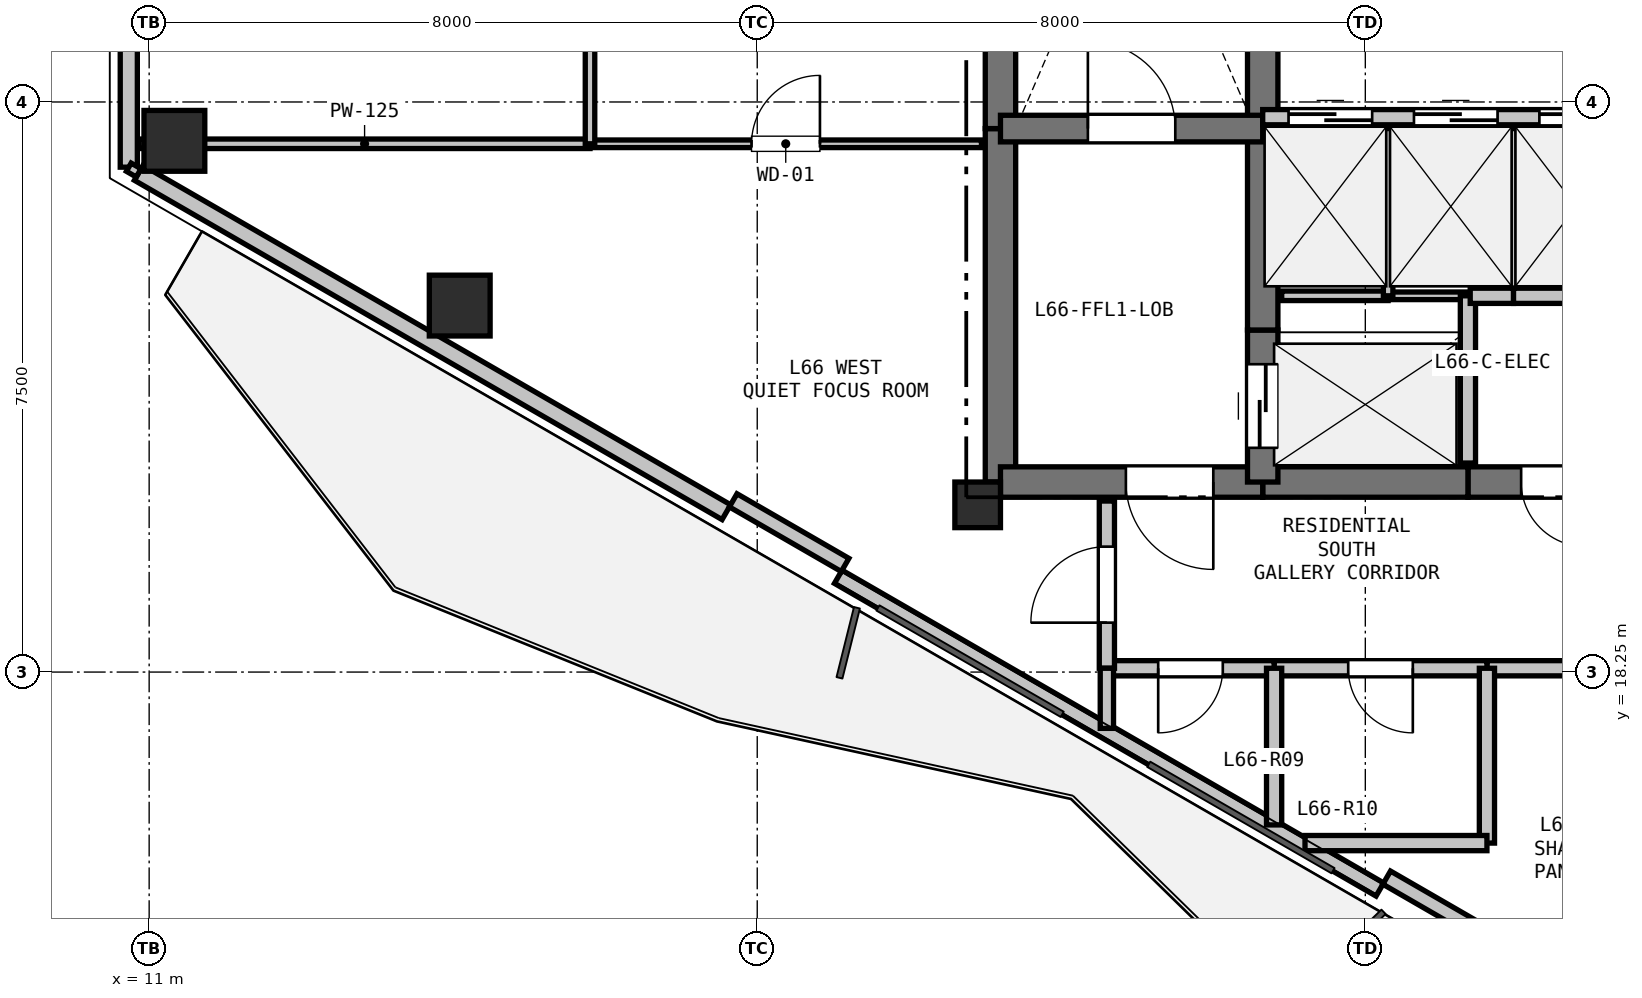
"""IFC4 building model, lengths in metres.
Left out: names, types, materials, properties, quantities, classifications, styles, units other than length and angle.
Written with IfcOpenShell. Run it as: python <this file> out.ifc"""

import sys

from ifc_helpers import new_model, si_unit, direction, frame, frame_2d, origin, origin_2d, place, context, subcontext, project, spatial, rectangle, hollow_rectangle, extrude, element, fill, save


model = new_model("IFC4")
c1 = context("Model", 3, precision=1e-05, world=origin(), true_north=direction((0.0, 1.0)))
c2 = subcontext(c1, "Body", "Model", "MODEL_VIEW")
j1 = project(units=[si_unit("LENGTHUNIT", "METRE"), si_unit("PLANEANGLEUNIT", "RADIAN")], contexts=[c1])
p1 = place(None, origin())
s1 = spatial("IfcSite", under=j1, at=p1, CompositionType="ELEMENT")
p2 = place(p1, origin())
s2 = spatial("IfcBuilding", under=s1, at=p2, CompositionType="ELEMENT")
p3 = place(p2, frame((0.0, 0.0, 236.4)))
s3 = spatial("IfcBuildingStorey", under=s2, at=p3, CompositionType="ELEMENT", Elevation=236.4)
p4 = place(p3, frame((21.9, 20.45, 0.0), z_axis=(0.0, 0.0, 1.0), x_axis=(1.0, 0.0, 0.0)))
e1 = element("IfcColumn", 1, at=p4, inside=s3, PredefinedType="COLUMN", context=c2, shape_type="SweptSolid", body=[
    extrude(rectangle(XDim=0.6, YDim=0.6, at=origin_2d()), origin(), (0.0, 0.0, 1.0), 3.3),
])
for number, where, z_axis, x_axis in (
    (2, (15.086, 23.072, 0.0), (0.0, 0.0, 1.0), (1.0, 0.0, 0.0)),
    (3, (11.332, 25.239, 0.0), (0.0, 0.0, 1.0), (1.0, 0.0, 0.0)),
):
    element("IfcColumn", number, at=place(p3, frame(where, z_axis=z_axis, x_axis=x_axis)), inside=s3, PredefinedType="COLUMN", context=c2, shape_type="SweptSolid", body=[
        extrude(hollow_rectangle(XDim=0.8, YDim=0.8, WallThickness=0.025, at=origin_2d()), origin(), (0.0, 0.0, 1.0), 3.3),
    ])
p5 = place(p3, frame((10.732, 24.892, 0.0), z_axis=(0.0, 0.0, 1.0), x_axis=(0.0, 1.0, 0.0)))
e4 = element("IfcWall", 4, at=p5, inside=s3, PredefinedType="SOLIDWALL", context=c2, shape_type="SweptSolid", body=[
    extrude(rectangle(XDim=3.715, YDim=0.225, at=frame_2d((1.858, 0.0))), origin(), (0.0, 0.0, 1.0), 2.7),
])
p6 = place(p3, frame((27.191, 15.389, 0.0), z_axis=(0.0, 0.0, 1.0), x_axis=(-0.866019557082, 0.500010126649, 0.0)))
e5 = element("IfcWall", 5, at=p6, inside=s3, PredefinedType="PARAPET", context=c2, shape_type="SweptSolid", body=[
    extrude(rectangle(XDim=8.228, YDim=0.2, at=frame_2d((4.114, 0.0))), origin(), (0.0, 0.0, 1.0), 0.2),
])
p7 = place(p3, frame((18.594, 20.354, 0.0), z_axis=(0.0, 0.0, 1.0), x_axis=(-0.866026655105, 0.499997832642, 0.0)))
e6 = element("IfcWall", 6, at=p7, inside=s3, PredefinedType="SOLIDWALL", context=c2, shape_type="SweptSolid", body=[
    extrude(rectangle(XDim=8.928, YDim=0.225, at=frame_2d((4.464, 0.0))), origin(), (0.0, 0.0, 1.0), 2.7),
])
for number, where, z_axis, x_axis in (
    (7, (28.754, 14.695, 0.0), (0.0, 0.0, 1.0), (-0.866, 0.5, 0.0)),
    (8, (20.156, 19.659, 0.0), (0.0, 0.0, 1.0), (-0.866, 0.5, 0.0)),
):
    element("IfcWall", number, at=place(p3, frame(where, z_axis=z_axis, x_axis=x_axis)), inside=s3, PredefinedType="PARAPET", context=c2, shape_type="SweptSolid", body=[
        extrude(rectangle(XDim=1.7, YDim=0.2, at=frame_2d((0.85, 0.0))), origin(), (0.0, 0.0, 1.0), 2.7),
    ])
p8 = place(p3, frame((22.2, 20.75, 0.0), z_axis=(0.0, 0.0, 1.0), x_axis=(0.0, 1.0, 0.0)))
e9 = element("IfcWall", 9, at=p8, inside=s3, PredefinedType="SHEAR", context=c2, shape_type="SweptSolid", body=[
    extrude(rectangle(XDim=4.65, YDim=0.4, at=frame_2d((2.325, 0.0))), origin(), (0.0, 0.0, 1.0), 3.08),
])
p9 = place(p3, frame((22.2, 25.4, 0.0), z_axis=(0.0, 0.0, 1.0), x_axis=(0.0, 1.0, 0.0)))
e10 = element("IfcWall", 10, at=p9, inside=s3, PredefinedType="SHEAR", context=c2, shape_type="SweptSolid", body=[
    extrude(rectangle(XDim=7.35, YDim=0.4, at=frame_2d((3.675, 0.0))), origin(), (0.0, 0.0, 1.0), 3.08),
])
p10 = place(p3, frame((30.6, 20.75, 0.0), z_axis=(0.0, 0.0, 1.0), x_axis=(-1.0, 0.0, 0.0)))
e11 = element("IfcWall", 11, at=p10, inside=s3, PredefinedType="SHEAR", context=c2, shape_type="SweptSolid", body=[
    extrude(rectangle(XDim=2.25, YDim=0.4, at=frame_2d((1.125, 0.0))), origin(), (0.0, 0.0, 1.0), 3.08),
])
p11 = place(p10, frame((0.7, 0.0, 0.0)))
e12 = element("IfcOpeningElement", 12, at=p11, cuts=e11, PredefinedType="OPENING", context=c2, shape_type="SweptSolid", body=[
    extrude(rectangle(XDim=0.85, YDim=2.1, at=frame_2d((0.425, 1.05))), frame((0.0, 0.21, 0.0), z_axis=(0.0, -1.0, 0.0), x_axis=(1.0, 0.0, 0.0)), (0.0, 0.0, 1.0), 0.42),
])
p12 = place(p3, frame((28.35, 20.75, 0.0), z_axis=(0.0, 0.0, 1.0), x_axis=(-1.0, 0.0, 0.0)))
e13 = element("IfcWall", 13, at=p12, inside=s3, PredefinedType="SHEAR", context=c2, shape_type="SweptSolid", body=[
    extrude(rectangle(XDim=2.7, YDim=0.4, at=frame_2d((1.35, 0.0))), origin(), (0.0, 0.0, 1.0), 3.08),
])
p13 = place(p3, frame((25.65, 20.75, 0.0), z_axis=(0.0, 0.0, 1.0), x_axis=(-1.0, 0.0, 0.0)))
e14 = element("IfcWall", 14, at=p13, inside=s3, PredefinedType="SHEAR", context=c2, shape_type="SweptSolid", body=[
    extrude(rectangle(XDim=3.45, YDim=0.4, at=frame_2d((1.725, 0.0))), origin(), (0.0, 0.0, 1.0), 3.08),
])
p14 = place(p13, frame((0.65, 0.0, 0.0)))
e15 = element("IfcOpeningElement", 15, at=p14, cuts=e14, PredefinedType="OPENING", context=c2, shape_type="SweptSolid", body=[
    extrude(rectangle(XDim=1.15, YDim=2.15, at=frame_2d((0.575, 1.075))), frame((0.0, 0.21, 0.0), z_axis=(0.0, -1.0, 0.0), x_axis=(1.0, 0.0, 0.0)), (0.0, 0.0, 1.0), 0.42),
])
p15 = place(p3, frame((25.65, 20.75, 0.0), z_axis=(0.0, 0.0, 1.0), x_axis=(0.0, 1.0, 0.0)))
e16 = element("IfcWall", 16, at=p15, inside=s3, PredefinedType="SHEAR", context=c2, shape_type="SweptSolid", body=[
    extrude(rectangle(XDim=2.0, YDim=0.4, at=frame_2d((1.0, 0.0))), origin(), (0.0, 0.0, 1.0), 3.08),
])
p16 = place(p15, frame((0.45, 0.0, 0.0)))
e17 = element("IfcOpeningElement", 17, at=p16, cuts=e16, PredefinedType="OPENING", context=c2, shape_type="SweptSolid", body=[
    extrude(rectangle(XDim=1.1, YDim=2.15, at=frame_2d((0.55, 1.075))), frame((0.0, 0.21, 0.0), z_axis=(0.0, -1.0, 0.0), x_axis=(1.0, 0.0, 0.0)), (0.0, 0.0, 1.0), 0.42),
])
p17 = place(p3, frame((25.65, 22.75, 0.0), z_axis=(0.0, 0.0, 1.0), x_axis=(0.0, 1.0, 0.0)))
e18 = element("IfcWall", 18, at=p17, inside=s3, PredefinedType="SHEAR", context=c2, shape_type="SweptSolid", body=[
    extrude(rectangle(XDim=2.8, YDim=0.4, at=frame_2d((1.4, 0.0))), origin(), (0.0, 0.0, 1.0), 3.08),
])
p18 = place(p3, frame((25.65, 25.55, 0.0), z_axis=(0.0, 0.0, 1.0), x_axis=(0.0, 1.0, 0.0)))
e19 = element("IfcWall", 19, at=p18, inside=s3, PredefinedType="SHEAR", context=c2, shape_type="SweptSolid", body=[
    extrude(rectangle(XDim=2.4, YDim=0.4, at=frame_2d((1.2, 0.0))), origin(), (0.0, 0.0, 1.0), 3.08),
])
p19 = place(p3, frame((22.2, 25.4, 0.0), z_axis=(0.0, 0.0, 1.0), x_axis=(1.0, 0.0, 0.0)))
e20 = element("IfcWall", 20, at=p19, inside=s3, PredefinedType="SHEAR", context=c2, shape_type="SweptSolid", body=[
    extrude(rectangle(XDim=3.45, YDim=0.35, at=frame_2d((1.725, 0.0))), origin(), (0.0, 0.0, 1.0), 3.08),
])
p20 = place(p19, frame((1.15, 0.0, 0.0)))
e21 = element("IfcOpeningElement", 21, at=p20, cuts=e20, PredefinedType="OPENING", context=c2, shape_type="SweptSolid", body=[
    extrude(rectangle(XDim=1.15, YDim=2.15, at=frame_2d((0.575, 1.075))), frame((0.0, 0.185, 0.0), z_axis=(0.0, -1.0, 0.0), x_axis=(1.0, 0.0, 0.0)), (0.0, 0.0, 1.0), 0.37),
])
p21 = place(p3, frame((25.65, 25.55, 0.0), z_axis=(0.0, 0.0, 1.0), x_axis=(1.0, 0.0, 0.0)))
e22 = element("IfcWall", 22, at=p21, inside=s3, PredefinedType="PARTITIONING", context=c2, shape_type="SweptSolid", body=[
    extrude(rectangle(XDim=4.95, YDim=0.2, at=frame_2d((2.475, 0.0))), origin(), (0.0, 0.0, 1.0), 3.08),
])
p22 = place(p21, frame((0.34, 0.0, 0.0)))
e23 = element("IfcOpeningElement", 23, at=p22, cuts=e22, PredefinedType="OPENING", context=c2, shape_type="SweptSolid", body=[
    extrude(rectangle(XDim=1.1, YDim=2.15, at=frame_2d((0.55, 1.075))), frame((0.0, 0.11, 0.0), z_axis=(0.0, -1.0, 0.0), x_axis=(1.0, 0.0, 0.0)), (0.0, 0.0, 1.0), 0.22),
])
p23 = place(p21, frame((1.99, 0.0, 0.0)))
e24 = element("IfcOpeningElement", 24, at=p23, cuts=e22, PredefinedType="OPENING", context=c2, shape_type="SweptSolid", body=[
    extrude(rectangle(XDim=1.1, YDim=2.15, at=frame_2d((0.55, 1.075))), frame((0.0, 0.11, 0.0), z_axis=(0.0, -1.0, 0.0), x_axis=(1.0, 0.0, 0.0)), (0.0, 0.0, 1.0), 0.22),
])
p24 = place(p21, frame((3.64, 0.0, 0.0)))
e25 = element("IfcOpeningElement", 25, at=p24, cuts=e22, PredefinedType="OPENING", context=c2, shape_type="SweptSolid", body=[
    extrude(rectangle(XDim=1.1, YDim=2.15, at=frame_2d((0.55, 1.075))), frame((0.0, 0.11, 0.0), z_axis=(0.0, -1.0, 0.0), x_axis=(1.0, 0.0, 0.0)), (0.0, 0.0, 1.0), 0.22),
])
p25 = place(p3, frame((25.9, 23.2, 0.0), z_axis=(0.0, 0.0, 1.0), x_axis=(1.0, 0.0, 0.0)))
e26 = element("IfcWall", 26, at=p25, inside=s3, PredefinedType="PARTITIONING", context=c2, shape_type="SweptSolid", body=[
    extrude(rectangle(XDim=1.4, YDim=0.125, at=frame_2d((0.7, 0.0))), origin(), (0.0, 0.0, 1.0), 3.08),
])
p26 = place(p3, frame((27.3, 23.2, 0.0), z_axis=(0.0, 0.0, 1.0), x_axis=(1.0, 0.0, 0.0)))
e27 = element("IfcWall", 27, at=p26, inside=s3, PredefinedType="PARTITIONING", context=c2, shape_type="SweptSolid", body=[
    extrude(rectangle(XDim=1.05, YDim=0.1, at=frame_2d((0.525, 0.0))), origin(), (0.0, 0.0, 1.0), 3.08),
])
p27 = place(p3, frame((28.35, 23.2, 0.0), z_axis=(0.0, 0.0, 1.0), x_axis=(0.0, -1.0, 0.0)))
e28 = element("IfcWall", 28, at=p27, inside=s3, PredefinedType="PARTITIONING", context=c2, shape_type="SweptSolid", body=[
    extrude(rectangle(XDim=2.2, YDim=0.2, at=frame_2d((1.1, 0.0))), origin(), (0.0, 0.0, 1.0), 3.08),
])
p28 = place(p3, frame((27.3, 25.4, 0.0), z_axis=(0.0, 0.0, 1.0), x_axis=(0.0, -1.0, 0.0)))
e29 = element("IfcWall", 29, at=p28, inside=s3, PredefinedType="PARTITIONING", context=c2, shape_type="SweptSolid", body=[
    extrude(rectangle(XDim=2.2, YDim=0.125, at=frame_2d((1.1, 0.0))), origin(), (0.0, 0.0, 1.0), 3.08),
])
p29 = place(p3, frame((28.95, 25.4, 0.0), z_axis=(0.0, 0.0, 1.0), x_axis=(0.0, -1.0, 0.0)))
e30 = element("IfcWall", 30, at=p29, inside=s3, PredefinedType="PARTITIONING", context=c2, shape_type="SweptSolid", body=[
    extrude(rectangle(XDim=2.2, YDim=0.1, at=frame_2d((1.1, 0.0))), origin(), (0.0, 0.0, 1.0), 3.08),
])
p30 = place(p3, frame((28.95, 23.2, 0.0), z_axis=(0.0, 0.0, 1.0), x_axis=(-1.0, 0.0, 0.0)))
e31 = element("IfcWall", 31, at=p30, inside=s3, PredefinedType="PARTITIONING", context=c2, shape_type="SweptSolid", body=[
    extrude(rectangle(XDim=0.57, YDim=0.2, at=frame_2d((0.285, 0.0))), origin(), (0.0, 0.0, 1.0), 3.08),
])
p31 = place(p3, frame((30.6, 23.2, 0.0), z_axis=(0.0, 0.0, 1.0), x_axis=(-1.0, 0.0, 0.0)))
e32 = element("IfcWall", 32, at=p31, inside=s3, PredefinedType="PARTITIONING", context=c2, shape_type="SweptSolid", body=[
    extrude(rectangle(XDim=1.65, YDim=0.2, at=frame_2d((0.825, 0.0))), origin(), (0.0, 0.0, 1.0), 3.08),
])
p32 = place(p3, frame((31.8, 18.3, 0.0), z_axis=(0.0, 0.0, 1.0), x_axis=(-1.0, 0.0, 0.0)))
e33 = element("IfcWall", 33, at=p32, inside=s3, PredefinedType="PARTITIONING", context=c2, shape_type="SweptSolid", body=[
    extrude(rectangle(XDim=3.2, YDim=0.2, at=frame_2d((1.6, 0.0))), origin(), (0.0, 0.0, 1.0), 3.08),
])
p33 = place(p32, frame((1.1, 0.0, 0.0)))
e34 = element("IfcOpeningElement", 34, at=p33, cuts=e33, PredefinedType="OPENING", context=c2, shape_type="SweptSolid", body=[
    extrude(rectangle(XDim=1.0, YDim=2.15, at=frame_2d((0.5, 1.075))), frame((0.0, 0.11, 0.0), z_axis=(0.0, -1.0, 0.0), x_axis=(1.0, 0.0, 0.0)), (0.0, 0.0, 1.0), 0.22),
])
p34 = place(p3, frame((28.6, 18.3, 0.0), z_axis=(0.0, 0.0, 1.0), x_axis=(-1.0, 0.0, 0.0)))
e35 = element("IfcWall", 35, at=p34, inside=s3, PredefinedType="PARTITIONING", context=c2, shape_type="SweptSolid", body=[
    extrude(rectangle(XDim=2.8, YDim=0.2, at=frame_2d((1.4, 0.0))), origin(), (0.0, 0.0, 1.0), 3.08),
])
p35 = place(p34, frame((0.975, 0.0, 0.0)))
e36 = element("IfcOpeningElement", 36, at=p35, cuts=e35, PredefinedType="OPENING", context=c2, shape_type="SweptSolid", body=[
    extrude(rectangle(XDim=0.85, YDim=2.1, at=frame_2d((0.425, 1.05))), frame((0.0, 0.11, 0.0), z_axis=(0.0, -1.0, 0.0), x_axis=(1.0, 0.0, 0.0)), (0.0, 0.0, 1.0), 0.22),
])
p36 = place(p3, frame((25.8, 18.3, 0.0), z_axis=(0.0, 0.0, 1.0), x_axis=(-1.0, 0.0, 0.0)))
e37 = element("IfcWall", 37, at=p36, inside=s3, PredefinedType="PARTITIONING", context=c2, shape_type="SweptSolid", body=[
    extrude(rectangle(XDim=2.2, YDim=0.2, at=frame_2d((1.1, 0.0))), origin(), (0.0, 0.0, 1.0), 2.365),
])
p37 = place(p36, frame((0.675, 0.0, 0.0)))
e38 = element("IfcOpeningElement", 38, at=p37, cuts=e37, PredefinedType="OPENING", context=c2, shape_type="SweptSolid", body=[
    extrude(rectangle(XDim=0.85, YDim=2.1, at=frame_2d((0.425, 1.05))), frame((0.0, 0.11, 0.0), z_axis=(0.0, -1.0, 0.0), x_axis=(1.0, 0.0, 0.0)), (0.0, 0.0, 1.0), 0.22),
])
p38 = place(p3, frame((23.6, 18.3, 0.0), z_axis=(0.0, 0.0, 1.0), x_axis=(0.0, 1.0, 0.0)))
e39 = element("IfcWall", 39, at=p38, inside=s3, PredefinedType="PARTITIONING", context=c2, shape_type="SweptSolid", body=[
    extrude(rectangle(XDim=2.2, YDim=0.2, at=frame_2d((1.1, 0.0))), origin(), (0.0, 0.0, 1.0), 2.528),
])
p39 = place(p38, frame((0.6, 0.0, 0.0)))
e40 = element("IfcOpeningElement", 40, at=p39, cuts=e39, PredefinedType="OPENING", context=c2, shape_type="SweptSolid", body=[
    extrude(rectangle(XDim=1.0, YDim=2.15, at=frame_2d((0.5, 1.075))), frame((0.0, 0.11, 0.0), z_axis=(0.0, -1.0, 0.0), x_axis=(1.0, 0.0, 0.0)), (0.0, 0.0, 1.0), 0.22),
])
p40 = place(p3, frame((25.8, 18.3, 0.0), z_axis=(0.0, 0.0, 1.0), x_axis=(0.0, -1.0, 0.0)))
e41 = element("IfcWall", 41, at=p40, inside=s3, PredefinedType="PARTITIONING", context=c2, shape_type="SweptSolid", body=[
    extrude(rectangle(XDim=2.061, YDim=0.2, at=frame_2d((1.031, 0.0))), origin(), (0.0, 0.0, 1.0), 2.365),
])
p41 = place(p3, frame((23.6, 17.509, 0.0), z_axis=(0.0, 0.0, 1.0), x_axis=(0.0, 1.0, 0.0)))
e42 = element("IfcWall", 42, at=p41, inside=s3, PredefinedType="PLUMBINGWALL", context=c2, shape_type="SweptSolid", body=[
    extrude(rectangle(XDim=0.791, YDim=0.175, at=frame_2d((0.396, 0.0))), origin(), (0.0, 0.0, 1.0), 2.365),
])
p42 = place(p3, frame((10.868, 25.2, 0.0), z_axis=(0.0, 0.0, 1.0), x_axis=(1.0, 0.0, 0.0)))
e43 = element("IfcWall", 43, at=p42, inside=s3, PredefinedType="PARTITIONING", context=c2, shape_type="SweptSolid", body=[
    extrude(rectangle(XDim=5.932, YDim=0.125, at=frame_2d((2.966, 0.0))), origin(), (0.0, 0.0, 1.0), 2.528),
])
p43 = place(p3, frame((16.8, 25.2, 0.0), z_axis=(0.0, 0.0, 1.0), x_axis=(1.0, 0.0, 0.0)))
e44 = element("IfcWall", 44, at=p43, inside=s3, PredefinedType="PARTITIONING", context=c2, shape_type="SweptSolid", body=[
    extrude(rectangle(XDim=5.15, YDim=0.1, at=frame_2d((2.575, 0.0))), origin(), (0.0, 0.0, 1.0), 2.605),
])
p44 = place(p43, frame((2.125, 0.0, 0.0)))
e45 = element("IfcOpeningElement", 45, at=p44, cuts=e44, PredefinedType="OPENING", context=c2, shape_type="SweptSolid", body=[
    extrude(rectangle(XDim=0.9, YDim=2.1, at=frame_2d((0.45, 1.05))), frame((0.0, 0.06, 0.0), z_axis=(0.0, -1.0, 0.0), x_axis=(1.0, 0.0, 0.0)), (0.0, 0.0, 1.0), 0.12),
])
p45 = place(p3, frame((10.862, 24.817, 0.0), z_axis=(0.0, 0.0, 1.0), x_axis=(-0.866131372301, 0.499816412211, 0.0)))
e46 = element("IfcWall", 46, at=p45, inside=s3, PredefinedType="PARTITIONING", context=c2, shape_type="SweptSolid", body=[
    extrude(rectangle(XDim=0.15, YDim=0.125, at=frame_2d((0.075, 0.0))), origin(), (0.0, 0.0, 1.0), 3.08),
])
p46 = place(p3, frame((28.6, 18.3, 0.0), z_axis=(0.0, 0.0, 1.0), x_axis=(0.0, -1.0, 0.0)))
e47 = element("IfcWall", 47, at=p46, inside=s3, PredefinedType="PARTITIONING", context=c2, shape_type="SweptSolid", body=[
    extrude(rectangle(XDim=2.3, YDim=0.2, at=frame_2d((1.15, 0.0))), origin(), (0.0, 0.0, 1.0), 3.08),
])
p47 = place(p3, frame((28.6, 16.0, 0.0), z_axis=(0.0, 0.0, 1.0), x_axis=(-1.0, 0.0, 0.0)))
e48 = element("IfcWall", 48, at=p47, inside=s3, PredefinedType="PARTITIONING", context=c2, shape_type="SweptSolid", body=[
    extrude(rectangle(XDim=2.394, YDim=0.2, at=frame_2d((1.197, 0.0))), origin(), (0.0, 0.0, 1.0), 2.365),
])
p48 = place(p3, frame((16.8, 25.2, 0.0), z_axis=(0.0, 0.0, 1.0), x_axis=(0.0, 1.0, 0.0)))
e49 = element("IfcWall", 49, at=p48, inside=s3, PredefinedType="PARTITIONING", context=c2, shape_type="SweptSolid", body=[
    extrude(rectangle(XDim=3.6, YDim=0.125, at=frame_2d((1.8, 0.0))), origin(), (0.0, 0.0, 1.0), 3.08),
])
p49 = place(p22, origin())
e50 = element("IfcDoor", 50, at=p49, inside=s3, OperationType="SLIDING_TO_LEFT", PredefinedType="DOOR", context=c2, shape_type="SweptSolid", body=[
    extrude(rectangle(XDim=1.1, YDim=2.15, at=frame_2d((0.55, 1.075))), frame((0.0, 0.025, 0.0), z_axis=(0.0, -1.0, 0.0), x_axis=(1.0, 0.0, 0.0)), (0.0, 0.0, 1.0), 0.05),
])
fill(e23, e50)
p50 = place(p23, origin())
e51 = element("IfcDoor", 51, at=p50, inside=s3, OperationType="SLIDING_TO_LEFT", PredefinedType="DOOR", context=c2, shape_type="SweptSolid", body=[
    extrude(rectangle(XDim=1.1, YDim=2.15, at=frame_2d((0.55, 1.075))), frame((0.0, 0.025, 0.0), z_axis=(0.0, -1.0, 0.0), x_axis=(1.0, 0.0, 0.0)), (0.0, 0.0, 1.0), 0.05),
])
fill(e24, e51)
p51 = place(p24, origin())
e52 = element("IfcDoor", 52, at=p51, inside=s3, OperationType="SLIDING_TO_LEFT", PredefinedType="DOOR", context=c2, shape_type="SweptSolid", body=[
    extrude(rectangle(XDim=1.1, YDim=2.15, at=frame_2d((0.55, 1.075))), frame((0.0, 0.025, 0.0), z_axis=(0.0, -1.0, 0.0), x_axis=(1.0, 0.0, 0.0)), (0.0, 0.0, 1.0), 0.05),
])
fill(e25, e52)
p52 = place(p16, origin())
e53 = element("IfcDoor", 53, at=p52, inside=s3, OperationType="SLIDING_TO_LEFT", PredefinedType="DOOR", context=c2, shape_type="SweptSolid", body=[
    extrude(rectangle(XDim=1.1, YDim=2.15, at=frame_2d((0.55, 1.075))), frame((0.0, 0.025, 0.0), z_axis=(0.0, -1.0, 0.0), x_axis=(1.0, 0.0, 0.0)), (0.0, 0.0, 1.0), 0.05),
])
fill(e17, e53)
p53 = place(p20, origin())
e54 = element("IfcDoor", 54, at=p53, inside=s3, OperationType="SINGLE_SWING_LEFT", PredefinedType="DOOR", context=c2, shape_type="SweptSolid", body=[
    extrude(rectangle(XDim=1.15, YDim=2.15, at=frame_2d((0.575, 1.075))), frame((0.0, 0.025, 0.0), z_axis=(0.0, -1.0, 0.0), x_axis=(1.0, 0.0, 0.0)), (0.0, 0.0, 1.0), 0.05),
])
fill(e21, e54)
p54 = place(p14, origin())
e55 = element("IfcDoor", 55, at=p54, inside=s3, OperationType="SINGLE_SWING_LEFT", PredefinedType="DOOR", context=c2, shape_type="SweptSolid", body=[
    extrude(rectangle(XDim=1.15, YDim=2.15, at=frame_2d((0.575, 1.075))), frame((0.0, 0.025, 0.0), z_axis=(0.0, -1.0, 0.0), x_axis=(1.0, 0.0, 0.0)), (0.0, 0.0, 1.0), 0.05),
])
fill(e15, e55)
p55 = place(p37, origin())
e56 = element("IfcDoor", 56, at=p55, inside=s3, OperationType="SINGLE_SWING_RIGHT", PredefinedType="DOOR", context=c2, shape_type="SweptSolid", body=[
    extrude(rectangle(XDim=0.85, YDim=2.1, at=frame_2d((0.425, 1.05))), frame((0.0, 0.025, 0.0), z_axis=(0.0, -1.0, 0.0), x_axis=(1.0, 0.0, 0.0)), (0.0, 0.0, 1.0), 0.05),
])
fill(e38, e56)
p56 = place(p11, origin())
e57 = element("IfcDoor", 57, at=p56, inside=s3, OperationType="SINGLE_SWING_LEFT", PredefinedType="DOOR", context=c2, shape_type="SweptSolid", body=[
    extrude(rectangle(XDim=0.85, YDim=2.1, at=frame_2d((0.425, 1.05))), frame((0.0, 0.025, 0.0), z_axis=(0.0, -1.0, 0.0), x_axis=(1.0, 0.0, 0.0)), (0.0, 0.0, 1.0), 0.05),
])
fill(e12, e57)
p57 = place(p39, origin())
e58 = element("IfcDoor", 58, at=p57, inside=s3, OperationType="SINGLE_SWING_LEFT", PredefinedType="DOOR", context=c2, shape_type="SweptSolid", body=[
    extrude(rectangle(XDim=1.0, YDim=2.15, at=frame_2d((0.5, 1.075))), frame((0.0, 0.025, 0.0), z_axis=(0.0, -1.0, 0.0), x_axis=(1.0, 0.0, 0.0)), (0.0, 0.0, 1.0), 0.05),
])
fill(e40, e58)
p58 = place(p35, origin())
e59 = element("IfcDoor", 59, at=p58, inside=s3, OperationType="SINGLE_SWING_LEFT", PredefinedType="DOOR", context=c2, shape_type="SweptSolid", body=[
    extrude(rectangle(XDim=0.85, YDim=2.1, at=frame_2d((0.425, 1.05))), frame((0.0, 0.025, 0.0), z_axis=(0.0, -1.0, 0.0), x_axis=(1.0, 0.0, 0.0)), (0.0, 0.0, 1.0), 0.05),
])
fill(e36, e59)
p59 = place(p44, origin())
e60 = element("IfcDoor", 60, at=p59, inside=s3, OperationType="SINGLE_SWING_RIGHT", PredefinedType="DOOR", context=c2, shape_type="SweptSolid", body=[
    extrude(rectangle(XDim=0.9, YDim=2.1, at=frame_2d((0.45, 1.05))), frame((0.0, 0.025, 0.0), z_axis=(0.0, -1.0, 0.0), x_axis=(1.0, 0.0, 0.0)), (0.0, 0.0, 1.0), 0.05),
])
fill(e45, e60)
save(model, sys.argv[1])
